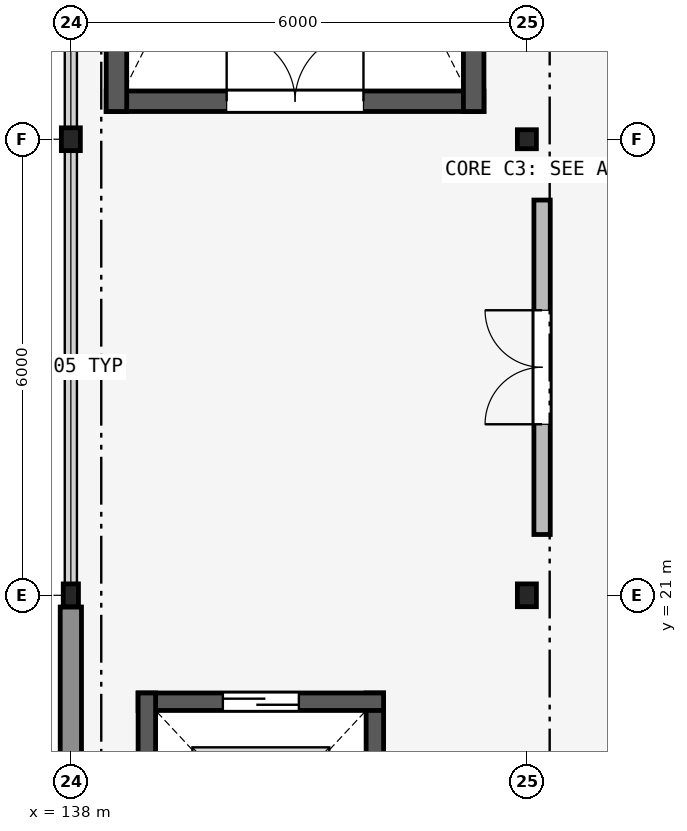
"""IFC4 building model, lengths in metres.
Left out: names, types, materials, properties, quantities, classifications, styles, units other than length and angle.
Written with IfcOpenShell. Run it as: python <this file> out.ifc"""

import sys

from ifc_helpers import new_model, si_unit, direction, frame, frame_2d, origin, origin_2d, place, context, subcontext, project, spatial, rectangle, hollow_rectangle, i_section, extrude, element, fill, save


model = new_model("IFC4")
c1 = context("Model", 3, precision=1e-05, world=origin(), true_north=direction((0.0, 1.0)))
c2 = subcontext(c1, "Body", "Model", "MODEL_VIEW")
j1 = project(units=[si_unit("LENGTHUNIT", "METRE"), si_unit("PLANEANGLEUNIT", "RADIAN")], contexts=[c1])
p1 = place(None, origin())
s1 = spatial("IfcSite", under=j1, at=p1, CompositionType="ELEMENT")
p2 = place(p1, origin())
s2 = spatial("IfcBuilding", under=s1, at=p2, CompositionType="ELEMENT")
p3 = place(p2, frame((0.0, 0.0, 26.1)))
s3 = spatial("IfcBuildingStorey", under=s2, at=p3, CompositionType="ELEMENT", Elevation=26.1)
p4 = place(p3, frame((138.0, 21.0, 0.0), z_axis=(0.0, 0.0, 1.0), x_axis=(1.0, 0.0, 0.0)))
e1 = element("IfcColumn", 1, at=p4, inside=s3, PredefinedType="COLUMN", context=c2, shape_type="SweptSolid", body=[
    extrude(hollow_rectangle(XDim=0.2, YDim=0.3, WallThickness=0.012, InnerFilletRadius=0.012, OuterFilletRadius=0.024, at=origin_2d()), origin(), (0.0, 0.0, 1.0), 3.9),
])
for number, where, z_axis, x_axis in (
    (2, (138.0, 27.0, 0.0), (0.0, 0.0, 1.0), (1.0, 0.0, 0.0)),
    (3, (144.0, 21.0, 0.0), (0.0, 0.0, 1.0), (1.0, 0.0, 0.0)),
):
    element("IfcColumn", number, at=place(p3, frame(where, z_axis=z_axis, x_axis=x_axis)), inside=s3, PredefinedType="COLUMN", context=c2, shape_type="SweptSolid", body=[
        extrude(i_section(OverallWidth=0.25, OverallDepth=0.3, WebThickness=0.01, FlangeThickness=0.01, FilletRadius=0.012, at=origin_2d()), origin(), (0.0, 0.0, 1.0), 3.9),
    ])
p5 = place(p3, frame((144.0, 27.0, 0.0), z_axis=(0.0, 0.0, 1.0), x_axis=(1.0, 0.0, 0.0)))
e4 = element("IfcColumn", 4, at=p5, inside=s3, PredefinedType="COLUMN", context=c2, shape_type="SweptSolid", body=[
    extrude(hollow_rectangle(XDim=0.25, YDim=0.25, WallThickness=0.012, InnerFilletRadius=0.012, OuterFilletRadius=0.024, at=origin_2d()), origin(), (0.0, 0.0, 1.0), 3.9),
])
p6 = place(p3, frame((138.0, 15.129, 0.0), z_axis=(0.0, 0.0, 1.0), x_axis=(0.0, 1.0, 0.0)))
e5 = element("IfcWall", 5, at=p6, inside=s3, PredefinedType="SOLIDWALL", context=c2, shape_type="SweptSolid", body=[
    extrude(rectangle(XDim=5.717, YDim=0.28, at=frame_2d((2.858, 0.0))), origin(), (0.0, 0.0, 1.0), 3.08),
])
p7 = place(p3, frame((138.465, 27.5, 0.0), z_axis=(0.0, 0.0, 1.0), x_axis=(1.0, 0.0, 0.0)))
e6 = element("IfcWall", 6, at=p7, inside=s3, PredefinedType="SHEAR", context=c2, shape_type="SweptSolid", body=[
    extrude(rectangle(XDim=4.97, YDim=0.27, at=frame_2d((2.485, 0.0))), origin(), (0.0, 0.0, 1.0), 3.76),
])
p8 = place(p7, frame((1.585, 0.0, 0.0)))
e7 = element("IfcOpeningElement", 7, at=p8, cuts=e6, PredefinedType="OPENING", context=c2, shape_type="SweptSolid", body=[
    extrude(rectangle(XDim=1.8, YDim=2.2, at=frame_2d((0.9, 1.1))), frame((0.0, 0.145, 0.0), z_axis=(0.0, -1.0, 0.0), x_axis=(1.0, 0.0, 0.0)), (0.0, 0.0, 1.0), 0.29),
])
for number, where, z_axis, x_axis in (
    (8, (143.3, 27.365, 0.0), (0.0, 0.0, 1.0), (0.0, 1.0, 0.0)),
    (9, (138.6, 36.935, 0.0), (0.0, 0.0, 1.0), (0.0, -1.0, 0.0)),
):
    element("IfcWall", number, at=place(p3, frame(where, z_axis=z_axis, x_axis=x_axis)), inside=s3, PredefinedType="SHEAR", context=c2, shape_type="SweptSolid", body=[
        extrude(rectangle(XDim=9.57, YDim=0.27, at=frame_2d((4.785, 0.0))), origin(), (0.0, 0.0, 1.0), 3.76),
    ])
p9 = place(p3, frame((144.2, 21.8, 0.0), z_axis=(0.0, 0.0, 1.0), x_axis=(0.0, 1.0, 0.0)))
e10 = element("IfcWall", 10, at=p9, inside=s3, PredefinedType="PARTITIONING", context=c2, shape_type="SweptSolid", body=[
    extrude(rectangle(XDim=4.4, YDim=0.215, at=frame_2d((2.2, 0.0))), origin(), (0.0, 0.0, 1.0), 3.18),
])
p10 = place(p9, frame((1.45, 0.0, 0.0)))
e11 = element("IfcOpeningElement", 11, at=p10, cuts=e10, PredefinedType="OPENING", context=c2, shape_type="SweptSolid", body=[
    extrude(rectangle(XDim=1.5, YDim=2.15, at=frame_2d((0.75, 1.075))), frame((0.0, 0.117, 0.0), z_axis=(0.0, -1.0, 0.0), x_axis=(1.0, 0.0, 0.0)), (0.0, 0.0, 1.0), 0.235),
])
p11 = place(p3, frame((142.0, 16.285, 0.0), z_axis=(0.0, 0.0, 1.0), x_axis=(0.0, 1.0, 0.0)))
e12 = element("IfcWall", 12, at=p11, inside=s3, PredefinedType="SHEAR", context=c2, shape_type="SweptSolid", body=[
    extrude(rectangle(XDim=3.43, YDim=0.23, at=frame_2d((1.715, 0.0))), origin(), (0.0, 0.0, 1.0), 3.9),
])
p12 = place(p3, frame((142.115, 19.6, 0.0), z_axis=(0.0, 0.0, 1.0), x_axis=(-1.0, 0.0, 0.0)))
e13 = element("IfcWall", 13, at=p12, inside=s3, PredefinedType="SHEAR", context=c2, shape_type="SweptSolid", body=[
    extrude(rectangle(XDim=3.23, YDim=0.23, at=frame_2d((1.615, 0.0))), origin(), (0.0, 0.0, 1.0), 3.9),
])
p13 = place(p12, frame((1.115, 0.0, 0.0)))
e14 = element("IfcOpeningElement", 14, at=p13, cuts=e13, PredefinedType="OPENING", context=c2, shape_type="SweptSolid", body=[
    extrude(rectangle(XDim=1.0, YDim=2.15, at=frame_2d((0.5, 1.075))), frame((0.0, 0.125, 0.0), z_axis=(0.0, -1.0, 0.0), x_axis=(1.0, 0.0, 0.0)), (0.0, 0.0, 1.0), 0.25),
])
p14 = place(p3, frame((139.0, 19.715, 0.0), z_axis=(0.0, 0.0, 1.0), x_axis=(0.0, -1.0, 0.0)))
e15 = element("IfcWall", 15, at=p14, inside=s3, PredefinedType="SHEAR", context=c2, shape_type="SweptSolid", body=[
    extrude(rectangle(XDim=3.43, YDim=0.23, at=frame_2d((1.715, 0.0))), origin(), (0.0, 0.0, 1.0), 3.9),
])
p15 = place(p8, origin())
e16 = element("IfcDoor", 16, at=p15, inside=s3, OperationType="DOUBLE_DOOR_SINGLE_SWING", PredefinedType="DOOR", context=c2, shape_type="SweptSolid", body=[
    extrude(rectangle(XDim=1.8, YDim=2.2, at=frame_2d((0.9, 1.1))), frame((0.0, 0.025, 0.0), z_axis=(0.0, -1.0, 0.0), x_axis=(1.0, 0.0, 0.0)), (0.0, 0.0, 1.0), 0.05),
])
fill(e7, e16)
p16 = place(p10, origin())
e17 = element("IfcDoor", 17, at=p16, inside=s3, OperationType="DOUBLE_DOOR_SINGLE_SWING", PredefinedType="DOOR", context=c2, shape_type="SweptSolid", body=[
    extrude(rectangle(XDim=1.5, YDim=2.15, at=frame_2d((0.75, 1.075))), frame((0.0, 0.025, 0.0), z_axis=(0.0, -1.0, 0.0), x_axis=(1.0, 0.0, 0.0)), (0.0, 0.0, 1.0), 0.05),
])
fill(e11, e17)
p17 = place(p13, origin())
e18 = element("IfcDoor", 18, at=p17, inside=s3, OperationType="SLIDING_TO_LEFT", PredefinedType="DOOR", context=c2, shape_type="SweptSolid", body=[
    extrude(rectangle(XDim=1.0, YDim=2.15, at=frame_2d((0.5, 1.075))), frame((0.0, 0.025, 0.0), z_axis=(0.0, -1.0, 0.0), x_axis=(1.0, 0.0, 0.0)), (0.0, 0.0, 1.0), 0.05),
])
fill(e14, e18)
save(model, sys.argv[1])
